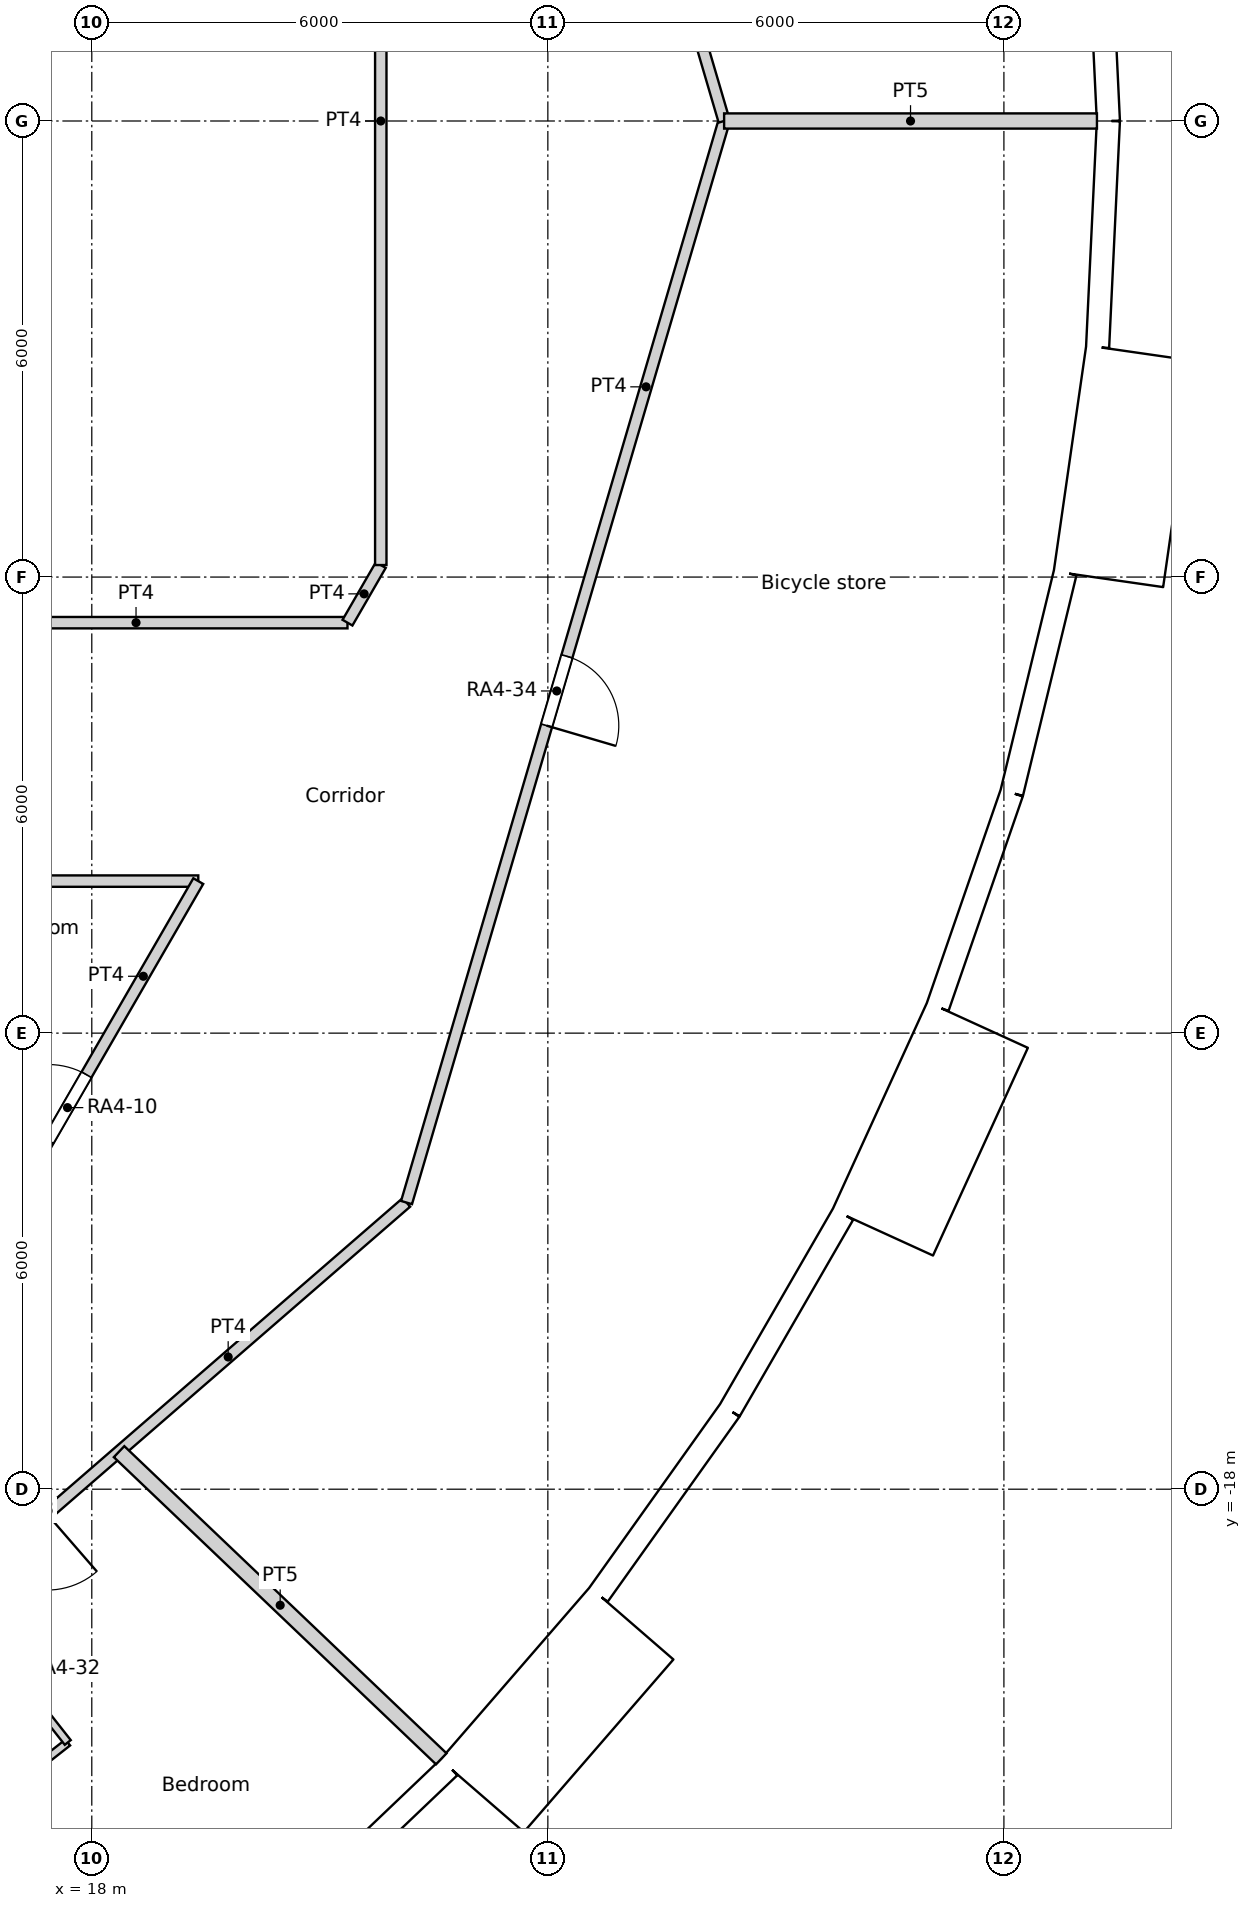
"""IFC4 building model, lengths in metres.
Left out: names, types, materials, properties, quantities, classifications, styles, units other than length and angle.
Written with IfcOpenShell. Run it as: python <this file> out.ifc"""

import sys

from ifc_helpers import new_model, si_unit, direction, frame, frame_2d, origin, origin_2d, place, context, subcontext, project, spatial, rectangle, circle, extrude, element, fill, save


model = new_model("IFC4")
c1 = context("Model", 3, precision=1e-05, world=origin(), true_north=direction((0.0, 1.0)))
c2 = subcontext(c1, "Body", "Model", "MODEL_VIEW")
j1 = project(units=[si_unit("LENGTHUNIT", "METRE"), si_unit("PLANEANGLEUNIT", "RADIAN")], contexts=[c1])
p1 = place(None, origin())
s1 = spatial("IfcSite", under=j1, at=p1, CompositionType="ELEMENT")
p2 = place(p1, origin())
s2 = spatial("IfcBuilding", under=s1, at=p2, CompositionType="ELEMENT")
p3 = place(p2, frame((0.0, 0.0, 60.6)))
s3 = spatial("IfcBuildingStorey", under=s2, at=p3, CompositionType="ELEMENT", Elevation=60.6)
for number, where, z_axis, x_axis in (
    (1, (30.275, 0.0, 0.0), (0.0, 0.0, 1.0), (1.0, 0.0, 0.0)),
    (2, (21.911, -20.892, 0.0), (0.0, 0.0, 1.0), (1.0, 0.0, 0.0)),
    (3, (25.469, -16.368, 0.0), (0.0, 0.0, 1.0), (1.0, 0.0, 0.0)),
    (4, (28.106, -11.252, 0.0), (0.0, 0.0, 1.0), (1.0, 0.0, 0.0)),
    (5, (29.728, -5.729, 0.0), (0.0, 0.0, 1.0), (1.0, 0.0, 0.0)),
):
    element("IfcColumn", number, at=place(p3, frame(where, z_axis=z_axis, x_axis=x_axis)), inside=s3, PredefinedType="COLUMN", context=c2, shape_type="SweptSolid", body=[
        extrude(circle(Radius=0.7, at=origin_2d()), origin(), (0.0, 0.0, 1.0), 3.6),
    ])
for number, where, z_axis, x_axis in (
    (6, (24.548, 0.0, 0.0), (0.0, 0.0, 1.0), (1.0, 0.0, 0.0)),
    (7, (18.805, -15.779, 0.0), (0.0, 0.0, 1.0), (1.0, 0.0, 0.0)),
    (8, (21.937, -11.017, 0.0), (0.0, 0.0, 1.0), (1.0, 0.0, 0.0)),
    (9, (23.886, -5.661, 0.0), (0.0, 0.0, 1.0), (1.0, 0.0, 0.0)),
):
    element("IfcColumn", number, at=place(p3, frame(where, z_axis=z_axis, x_axis=x_axis)), inside=s3, PredefinedType="COLUMN", context=c2, shape_type="SweptSolid", body=[
        extrude(circle(Radius=0.75, at=origin_2d()), origin(), (0.0, 0.0, 1.0), 3.6),
    ])
for number, where, z_axis, x_axis in (
    (10, (18.822, 0.0, 0.0), (0.0, 0.0, 1.0), (1.0, 0.0, 0.0)),
    (11, (17.986, -5.548, 0.0), (0.0, 0.0, 1.0), (1.0, 0.0, 0.0)),
):
    element("IfcColumn", number, at=place(p3, frame(where, z_axis=z_axis, x_axis=x_axis)), inside=s3, PredefinedType="COLUMN", context=c2, shape_type="SweptSolid", body=[
        extrude(circle(Radius=0.8, at=origin_2d()), origin(), (0.0, 0.0, 1.0), 3.6),
    ])
p4 = place(p3, frame((31.375, 0.0, 0.0), z_axis=(0.0, 0.0, 1.0), x_axis=(-0.047604077644, 0.998866283239, 0.0)))
e12 = element("IfcWall", 12, at=p4, inside=s3, PredefinedType="SOLIDWALL", context=c2, shape_type="SweptSolid", body=[
    extrude(rectangle(XDim=2.98, YDim=0.3, at=frame_2d((1.49, 0.0))), origin(), (0.0, 0.0, 1.0), 3.15),
])
p5 = place(p4, frame((1.49, 0.0, 1.55)))
e13 = element("IfcOpeningElement", 13, at=p5, cuts=e12, PredefinedType="OPENING", context=c2, shape_type="SweptSolid", body=[
    extrude(circle(Radius=0.9, at=origin_2d()), frame((0.0, 0.16, 0.0), z_axis=(0.0, -1.0, 0.0), x_axis=(1.0, 0.0, 0.0)), (0.0, 0.0, 1.0), 0.32),
])
p6 = place(p3, frame((20.546, -23.711, 0.0), z_axis=(0.0, 0.0, 1.0), x_axis=(0.723744206617, 0.690068346896, 0.0)))
e14 = element("IfcWall", 14, at=p6, inside=s3, PredefinedType="SOLIDWALL", context=c2, shape_type="SweptSolid", body=[
    extrude(rectangle(XDim=2.98, YDim=0.3, at=frame_2d((1.49, 0.0))), origin(), (0.0, 0.0, 1.0), 3.15),
])
p7 = place(p6, frame((1.49, 0.0, 1.55)))
e15 = element("IfcOpeningElement", 15, at=p7, cuts=e14, PredefinedType="OPENING", context=c2, shape_type="SweptSolid", body=[
    extrude(circle(Radius=0.9, at=origin_2d()), frame((0.0, 0.16, 0.0), z_axis=(0.0, -1.0, 0.0), x_axis=(1.0, 0.0, 0.0)), (0.0, 0.0, 1.0), 0.32),
])
p8 = place(p3, frame((23.137, -22.033, -0.45), z_axis=(0.0, 0.0, 1.0), x_axis=(0.654890259022, 0.75572398972, 0.0)))
e16 = element("IfcWall", 16, at=p8, inside=s3, PredefinedType="ELEMENTEDWALL", context=c2, shape_type="SweptSolid", body=[
    extrude(rectangle(XDim=3.0, YDim=1.45, at=frame_2d((1.5, 0.0))), origin(), (0.0, 0.0, 1.0), 3.6),
])
p9 = place(p8, frame((1.5, 0.0, 2.0)))
e17 = element("IfcOpeningElement", 17, at=p9, cuts=e16, PredefinedType="OPENING", context=c2, shape_type="SweptSolid", body=[
    extrude(circle(Radius=0.9, at=origin_2d()), frame((0.0, 0.735, 0.0), z_axis=(0.0, -1.0, 0.0), x_axis=(1.0, 0.0, 0.0)), (0.0, 0.0, 1.0), 1.47),
])
p10 = place(p3, frame((24.666, -19.389, 0.0), z_axis=(0.0, 0.0, 1.0), x_axis=(0.580059407678, 0.81457417315, 0.0)))
e18 = element("IfcWall", 18, at=p10, inside=s3, PredefinedType="SOLIDWALL", context=c2, shape_type="SweptSolid", body=[
    extrude(rectangle(XDim=2.979, YDim=0.3, at=frame_2d((1.49, 0.0))), origin(), (0.0, 0.0, 1.0), 2.65),
])
p11 = place(p10, frame((1.49, 0.0, 1.55)))
e19 = element("IfcOpeningElement", 19, at=p11, cuts=e18, PredefinedType="OPENING", context=c2, shape_type="SweptSolid", body=[
    extrude(circle(Radius=0.9, at=origin_2d()), frame((0.0, 0.16, 0.0), z_axis=(0.0, -1.0, 0.0), x_axis=(1.0, 0.0, 0.0)), (0.0, 0.0, 1.0), 0.32),
])
p12 = place(p3, frame((26.394, -16.962, 0.0), z_axis=(0.0, 0.0, 1.0), x_axis=(0.500025049464, 0.866010940986, 0.0)))
e20 = element("IfcWall", 20, at=p12, inside=s3, PredefinedType="SOLIDWALL", context=c2, shape_type="SweptSolid", body=[
    extrude(rectangle(XDim=2.98, YDim=0.3, at=frame_2d((1.49, 0.0))), origin(), (0.0, 0.0, 1.0), 3.15),
])
p13 = place(p12, frame((1.49, 0.0, 1.55)))
e21 = element("IfcOpeningElement", 21, at=p13, cuts=e20, PredefinedType="OPENING", context=c2, shape_type="SweptSolid", body=[
    extrude(circle(Radius=0.9, at=origin_2d()), frame((0.0, 0.16, 0.0), z_axis=(0.0, -1.0, 0.0), x_axis=(1.0, 0.0, 0.0)), (0.0, 0.0, 1.0), 0.32),
])
p14 = place(p3, frame((28.407, -14.622, -0.45), z_axis=(0.0, 0.0, 1.0), x_axis=(0.415427028395, 0.909626508012, 0.0)))
e22 = element("IfcWall", 22, at=p14, inside=s3, PredefinedType="ELEMENTEDWALL", context=c2, shape_type="SweptSolid", body=[
    extrude(rectangle(XDim=3.0, YDim=1.45, at=frame_2d((1.5, 0.0))), origin(), (0.0, 0.0, 1.0), 3.6),
])
p15 = place(p14, frame((1.5, 0.0, 2.0)))
e23 = element("IfcOpeningElement", 23, at=p15, cuts=e22, PredefinedType="OPENING", context=c2, shape_type="SweptSolid", body=[
    extrude(circle(Radius=0.9, at=origin_2d()), frame((0.0, 0.735, 0.0), z_axis=(0.0, -1.0, 0.0), x_axis=(1.0, 0.0, 0.0)), (0.0, 0.0, 1.0), 1.47),
])
p16 = place(p3, frame((29.129, -11.655, 0.0), z_axis=(0.0, 0.0, 1.0), x_axis=(0.327071167136, 0.944999709856, 0.0)))
e24 = element("IfcWall", 24, at=p16, inside=s3, PredefinedType="SOLIDWALL", context=c2, shape_type="SweptSolid", body=[
    extrude(rectangle(XDim=2.98, YDim=0.3, at=frame_2d((1.49, 0.0))), origin(), (0.0, 0.0, 1.0), 2.65),
])
p17 = place(p16, frame((1.49, 0.0, 1.55)))
e25 = element("IfcOpeningElement", 25, at=p17, cuts=e24, PredefinedType="OPENING", context=c2, shape_type="SweptSolid", body=[
    extrude(circle(Radius=0.9, at=origin_2d()), frame((0.0, 0.16, 0.0), z_axis=(0.0, -1.0, 0.0), x_axis=(1.0, 0.0, 0.0)), (0.0, 0.0, 1.0), 0.32),
])
p18 = place(p3, frame((30.104, -8.839, 0.0), z_axis=(0.0, 0.0, 1.0), x_axis=(0.235743081534, 0.971815414319, 0.0)))
e26 = element("IfcWall", 26, at=p18, inside=s3, PredefinedType="SOLIDWALL", context=c2, shape_type="SweptSolid", body=[
    extrude(rectangle(XDim=2.979, YDim=0.3, at=frame_2d((1.49, 0.0))), origin(), (0.0, 0.0, 1.0), 3.15),
])
p19 = place(p18, frame((1.49, 0.0, 1.55)))
e27 = element("IfcOpeningElement", 27, at=p19, cuts=e26, PredefinedType="OPENING", context=c2, shape_type="SweptSolid", body=[
    extrude(circle(Radius=0.9, at=origin_2d()), frame((0.0, 0.16, 0.0), z_axis=(0.0, -1.0, 0.0), x_axis=(1.0, 0.0, 0.0)), (0.0, 0.0, 1.0), 0.32),
])
p20 = place(p3, frame((31.375, -6.027, -0.45), z_axis=(0.0, 0.0, 1.0), x_axis=(0.142332746704, 0.989818866872, 0.0)))
e28 = element("IfcWall", 28, at=p20, inside=s3, PredefinedType="ELEMENTEDWALL", context=c2, shape_type="SweptSolid", body=[
    extrude(rectangle(XDim=3.0, YDim=1.45, at=frame_2d((1.5, 0.0))), origin(), (0.0, 0.0, 1.0), 3.6),
])
p21 = place(p20, frame((1.5, 0.0, 2.0)))
e29 = element("IfcOpeningElement", 29, at=p21, cuts=e28, PredefinedType="OPENING", context=c2, shape_type="SweptSolid", body=[
    extrude(circle(Radius=0.9, at=origin_2d()), frame((0.0, 0.735, 0.0), z_axis=(0.0, -1.0, 0.0), x_axis=(1.0, 0.0, 0.0)), (0.0, 0.0, 1.0), 1.47),
])
p22 = place(p3, frame((31.233, -2.976, 0.0), z_axis=(0.0, 0.0, 1.0), x_axis=(0.047604077644, 0.998866283239, 0.0)))
e30 = element("IfcWall", 30, at=p22, inside=s3, PredefinedType="SOLIDWALL", context=c2, shape_type="SweptSolid", body=[
    extrude(rectangle(XDim=2.98, YDim=0.3, at=frame_2d((1.49, 0.0))), origin(), (0.0, 0.0, 1.0), 2.65),
])
p23 = place(p22, frame((1.49, 0.0, 1.55)))
e31 = element("IfcOpeningElement", 31, at=p23, cuts=e30, PredefinedType="OPENING", context=c2, shape_type="SweptSolid", body=[
    extrude(circle(Radius=0.9, at=origin_2d()), frame((0.0, 0.16, 0.0), z_axis=(0.0, -1.0, 0.0), x_axis=(1.0, 0.0, 0.0)), (0.0, 0.0, 1.0), 0.32),
])
p24 = place(p3, frame((14.0, -10.0, 0.0), z_axis=(0.0, 0.0, 1.0), x_axis=(1.0, 0.0, 0.0)))
e32 = element("IfcWall", 32, at=p24, inside=s3, PredefinedType="PARTITIONING", context=c2, shape_type="SweptSolid", body=[
    extrude(rectangle(XDim=5.401, YDim=0.15, at=frame_2d((2.7, 0.0))), origin(), (0.0, 0.0, 1.0), 3.15),
])
p25 = place(p3, frame((15.8, -6.6, 0.0), z_axis=(0.0, 0.0, 1.0), x_axis=(1.0, 0.0, 0.0)))
e33 = element("IfcWall", 33, at=p25, inside=s3, PredefinedType="PARTITIONING", context=c2, shape_type="SweptSolid", body=[
    extrude(rectangle(XDim=5.564, YDim=0.15, at=frame_2d((2.782, 0.0))), origin(), (0.0, 0.0, 1.0), 3.15),
])
p26 = place(p3, frame((21.364, -6.6, 0.0), z_axis=(0.0, 0.0, 1.0), x_axis=(0.500277597875, 0.865865073245, 0.0)))
e34 = element("IfcWall", 34, at=p26, inside=s3, PredefinedType="PARTITIONING", context=c2, shape_type="SweptSolid", body=[
    extrude(rectangle(XDim=0.875, YDim=0.15, at=frame_2d((0.438, 0.0))), origin(), (0.0, 0.0, 1.0), 3.15),
])
p27 = place(p3, frame((21.802, -5.842, 0.0), z_axis=(0.0, 0.0, 1.0), x_axis=(0.0, 1.0, 0.0)))
e35 = element("IfcWall", 35, at=p27, inside=s3, PredefinedType="PARTITIONING", context=c2, shape_type="SweptSolid", body=[
    extrude(rectangle(XDim=11.684, YDim=0.15, at=frame_2d((5.842, 0.0))), origin(), (0.0, 0.0, 1.0), 3.15),
])
p28 = place(p3, frame((15.96, -15.96, 0.0), z_axis=(0.0, 0.0, 1.0), x_axis=(0.499992689227, 0.86602962462, 0.0)))
e36 = element("IfcWall", 36, at=p28, inside=s3, PredefinedType="PARTITIONING", context=c2, shape_type="SweptSolid", body=[
    extrude(rectangle(XDim=6.882, YDim=0.15, at=frame_2d((3.441, 0.0))), origin(), (0.0, 0.0, 1.0), 3.15),
])
p29 = place(p28, frame((2.941, 0.0, 0.0)))
e37 = element("IfcOpeningElement", 37, at=p29, cuts=e36, PredefinedType="OPENING", context=c2, shape_type="SweptSolid", body=[
    extrude(rectangle(XDim=1.0, YDim=2.04, at=frame_2d((0.5, 1.02))), frame((0.0, 0.075, 0.0), z_axis=(0.0, -1.0, 0.0), x_axis=(1.0, 0.0, 0.0)), (0.0, 0.0, 1.0), 0.15),
])
p30 = place(p3, frame((22.141, 14.229, 0.0), z_axis=(0.0, 0.0, 1.0), x_axis=(0.281730446162, -0.959493593363, 0.0)))
e38 = element("IfcWall", 38, at=p30, inside=s3, PredefinedType="PARTITIONING", context=c2, shape_type="SweptSolid", body=[
    extrude(rectangle(XDim=14.83, YDim=0.15, at=frame_2d((7.415, 0.0))), origin(), (0.0, 0.0, 1.0), 3.15),
])
p31 = place(p30, frame((5.715, 0.0, 0.0)))
e39 = element("IfcOpeningElement", 39, at=p31, cuts=e38, PredefinedType="OPENING", context=c2, shape_type="SweptSolid", body=[
    extrude(rectangle(XDim=1.8, YDim=2.1, at=frame_2d((0.9, 1.05))), frame((0.0, 0.075, 0.0), z_axis=(0.0, -1.0, 0.0), x_axis=(1.0, 0.0, 0.0)), (0.0, 0.0, 1.0), 0.15),
])
p32 = place(p3, frame((13.247, -21.939, 0.0), z_axis=(0.0, 0.0, 1.0), x_axis=(0.755420750547, 0.655240024451, 0.0)))
e40 = element("IfcWall", 40, at=p32, inside=s3, PredefinedType="PARTITIONING", context=c2, shape_type="SweptSolid", body=[
    extrude(rectangle(XDim=11.771, YDim=0.15, at=frame_2d((5.885, 0.0))), origin(), (0.0, 0.0, 1.0), 3.15),
])
p33 = place(p32, frame((4.513, 0.0, 0.0)))
e41 = element("IfcOpeningElement", 41, at=p33, cuts=e40, PredefinedType="OPENING", context=c2, shape_type="SweptSolid", body=[
    extrude(rectangle(XDim=1.0, YDim=2.1, at=frame_2d((0.5, 1.05))), frame((0.0, 0.075, 0.0), z_axis=(0.0, -1.0, 0.0), x_axis=(1.0, 0.0, 0.0)), (0.0, 0.0, 1.0), 0.15),
])
p34 = place(p3, frame((22.141, -14.229, 0.0), z_axis=(0.0, 0.0, 1.0), x_axis=(0.281730446162, 0.959493593363, 0.0)))
e42 = element("IfcWall", 42, at=p34, inside=s3, PredefinedType="PARTITIONING", context=c2, shape_type="SweptSolid", body=[
    extrude(rectangle(XDim=14.83, YDim=0.15, at=frame_2d((7.415, 0.0))), origin(), (0.0, 0.0, 1.0), 3.15),
])
p35 = place(p34, frame((6.54, 0.0, 0.0)))
e43 = element("IfcOpeningElement", 43, at=p35, cuts=e42, PredefinedType="OPENING", context=c2, shape_type="SweptSolid", body=[
    extrude(rectangle(XDim=0.95, YDim=2.1, at=frame_2d((0.475, 1.05))), frame((0.0, 0.075, 0.0), z_axis=(0.0, -1.0, 0.0), x_axis=(1.0, 0.0, 0.0)), (0.0, 0.0, 1.0), 0.15),
])
p36 = place(p3, frame((26.319, 0.0, 0.0), z_axis=(0.0, 0.0, 1.0), x_axis=(1.0, 0.0, 0.0)))
e44 = element("IfcWall", 44, at=p36, inside=s3, PredefinedType="PARTITIONING", context=c2, shape_type="SweptSolid", body=[
    extrude(rectangle(XDim=4.905, YDim=0.2, at=frame_2d((2.453, 0.0))), origin(), (0.0, 0.0, 1.0), 3.15),
])
p37 = place(p3, frame((14.715, -20.664, 0.0), z_axis=(0.0, 0.0, 1.0), x_axis=(0.57995989616, -0.814645026282, 0.0)))
e45 = element("IfcWall", 45, at=p37, inside=s3, PredefinedType="PARTITIONING", context=c2, shape_type="SweptSolid", body=[
    extrude(rectangle(XDim=5.857, YDim=0.15, at=frame_2d((2.928, 0.0))), origin(), (0.0, 0.0, 1.0), 3.15),
])
p38 = place(p3, frame((16.086, -22.589, 0.0), z_axis=(0.0, 0.0, 1.0), x_axis=(0.785984904201, 0.618245687707, 0.0)))
e46 = element("IfcWall", 46, at=p38, inside=s3, PredefinedType="PARTITIONING", context=c2, shape_type="SweptSolid", body=[
    extrude(rectangle(XDim=2.033, YDim=0.1, at=frame_2d((1.017, 0.0))), origin(), (0.0, 0.0, 1.0), 3.15),
])
p39 = place(p3, frame((16.168, -19.404, 0.0), z_axis=(0.0, 0.0, 1.0), x_axis=(0.618142414415, -0.786066126672, 0.0)))
e47 = element("IfcWall", 47, at=p39, inside=s3, PredefinedType="PARTITIONING", context=c2, shape_type="SweptSolid", body=[
    extrude(rectangle(XDim=2.453, YDim=0.1, at=frame_2d((1.226, 0.0))), origin(), (0.0, 0.0, 1.0), 3.15),
])
p40 = place(p39, frame((0.777, 0.0, 0.0)))
e48 = element("IfcOpeningElement", 48, at=p40, cuts=e47, PredefinedType="OPENING", context=c2, shape_type="SweptSolid", body=[
    extrude(rectangle(XDim=0.9, YDim=2.04, at=frame_2d((0.45, 1.02))), frame((0.0, 0.05, 0.0), z_axis=(0.0, -1.0, 0.0), x_axis=(1.0, 0.0, 0.0)), (0.0, 0.0, 1.0), 0.1),
])
p41 = place(p3, frame((18.359, -17.506, 0.0), z_axis=(0.0, 0.0, 1.0), x_axis=(0.723808715798, -0.690000683286, 0.0)))
e49 = element("IfcWall", 49, at=p41, inside=s3, PredefinedType="PARTITIONING", context=c2, shape_type="SweptSolid", body=[
    extrude(rectangle(XDim=5.856, YDim=0.2, at=frame_2d((2.928, 0.0))), origin(), (0.0, 0.0, 1.0), 3.15),
])
p42 = place(p5, origin())
e50 = element("IfcWindow", 50, at=p42, inside=s3, PartitioningType="SINGLE_PANEL", PredefinedType="WINDOW", context=c2, shape_type="SweptSolid", body=[
    extrude(circle(Radius=0.9, at=origin_2d()), frame((0.0, 0.12, 0.0), z_axis=(0.0, -1.0, 0.0), x_axis=(1.0, 0.0, 0.0)), (0.0, 0.0, 1.0), 0.1),
])
fill(e13, e50)
p43 = place(p7, origin())
e51 = element("IfcWindow", 51, at=p43, inside=s3, PartitioningType="SINGLE_PANEL", PredefinedType="WINDOW", context=c2, shape_type="SweptSolid", body=[
    extrude(circle(Radius=0.9, at=origin_2d()), frame((0.0, 0.12, 0.0), z_axis=(0.0, -1.0, 0.0), x_axis=(1.0, 0.0, 0.0)), (0.0, 0.0, 1.0), 0.1),
])
fill(e15, e51)
p44 = place(p9, origin())
e52 = element("IfcWindow", 52, at=p44, inside=s3, PartitioningType="SINGLE_PANEL", PredefinedType="WINDOW", context=c2, shape_type="SweptSolid", body=[
    extrude(circle(Radius=0.9, at=origin_2d()), frame((0.0, 0.695, 0.0), z_axis=(0.0, -1.0, 0.0), x_axis=(1.0, 0.0, 0.0)), (0.0, 0.0, 1.0), 0.1),
])
fill(e17, e52)
p45 = place(p11, origin())
e53 = element("IfcWindow", 53, at=p45, inside=s3, PartitioningType="SINGLE_PANEL", PredefinedType="WINDOW", context=c2, shape_type="SweptSolid", body=[
    extrude(circle(Radius=0.9, at=origin_2d()), frame((0.0, 0.12, 0.0), z_axis=(0.0, -1.0, 0.0), x_axis=(1.0, 0.0, 0.0)), (0.0, 0.0, 1.0), 0.1),
])
fill(e19, e53)
p46 = place(p13, origin())
e54 = element("IfcWindow", 54, at=p46, inside=s3, PartitioningType="SINGLE_PANEL", PredefinedType="WINDOW", context=c2, shape_type="SweptSolid", body=[
    extrude(circle(Radius=0.9, at=origin_2d()), frame((0.0, 0.12, 0.0), z_axis=(0.0, -1.0, 0.0), x_axis=(1.0, 0.0, 0.0)), (0.0, 0.0, 1.0), 0.1),
])
fill(e21, e54)
p47 = place(p15, origin())
e55 = element("IfcWindow", 55, at=p47, inside=s3, PartitioningType="SINGLE_PANEL", PredefinedType="WINDOW", context=c2, shape_type="SweptSolid", body=[
    extrude(circle(Radius=0.9, at=origin_2d()), frame((0.0, 0.695, 0.0), z_axis=(0.0, -1.0, 0.0), x_axis=(1.0, 0.0, 0.0)), (0.0, 0.0, 1.0), 0.1),
])
fill(e23, e55)
p48 = place(p17, origin())
e56 = element("IfcWindow", 56, at=p48, inside=s3, PartitioningType="SINGLE_PANEL", PredefinedType="WINDOW", context=c2, shape_type="SweptSolid", body=[
    extrude(circle(Radius=0.9, at=origin_2d()), frame((0.0, 0.12, 0.0), z_axis=(0.0, -1.0, 0.0), x_axis=(1.0, 0.0, 0.0)), (0.0, 0.0, 1.0), 0.1),
])
fill(e25, e56)
p49 = place(p19, origin())
e57 = element("IfcWindow", 57, at=p49, inside=s3, PartitioningType="SINGLE_PANEL", PredefinedType="WINDOW", context=c2, shape_type="SweptSolid", body=[
    extrude(circle(Radius=0.9, at=origin_2d()), frame((0.0, 0.12, 0.0), z_axis=(0.0, -1.0, 0.0), x_axis=(1.0, 0.0, 0.0)), (0.0, 0.0, 1.0), 0.1),
])
fill(e27, e57)
p50 = place(p21, origin())
e58 = element("IfcWindow", 58, at=p50, inside=s3, PartitioningType="SINGLE_PANEL", PredefinedType="WINDOW", context=c2, shape_type="SweptSolid", body=[
    extrude(circle(Radius=0.9, at=origin_2d()), frame((0.0, 0.695, 0.0), z_axis=(0.0, -1.0, 0.0), x_axis=(1.0, 0.0, 0.0)), (0.0, 0.0, 1.0), 0.1),
])
fill(e29, e58)
p51 = place(p23, origin())
e59 = element("IfcWindow", 59, at=p51, inside=s3, PartitioningType="SINGLE_PANEL", PredefinedType="WINDOW", context=c2, shape_type="SweptSolid", body=[
    extrude(circle(Radius=0.9, at=origin_2d()), frame((0.0, 0.12, 0.0), z_axis=(0.0, -1.0, 0.0), x_axis=(1.0, 0.0, 0.0)), (0.0, 0.0, 1.0), 0.1),
])
fill(e31, e59)
p52 = place(p29, origin())
e60 = element("IfcDoor", 60, at=p52, inside=s3, OperationType="SINGLE_SWING_LEFT", PredefinedType="DOOR", context=c2, shape_type="SweptSolid", body=[
    extrude(rectangle(XDim=1.0, YDim=2.04, at=frame_2d((0.5, 1.02))), frame((0.0, 0.025, 0.0), z_axis=(0.0, -1.0, 0.0), x_axis=(1.0, 0.0, 0.0)), (0.0, 0.0, 1.0), 0.05),
])
fill(e37, e60)
p53 = place(p35, origin())
e61 = element("IfcDoor", 61, at=p53, inside=s3, OperationType="SINGLE_SWING_RIGHT", PredefinedType="DOOR", context=c2, shape_type="SweptSolid", body=[
    extrude(rectangle(XDim=0.95, YDim=2.1, at=frame_2d((0.475, 1.05))), frame((0.0, 0.025, 0.0), z_axis=(0.0, -1.0, 0.0), x_axis=(1.0, 0.0, 0.0)), (0.0, 0.0, 1.0), 0.05),
])
fill(e43, e61)
save(model, sys.argv[1])
